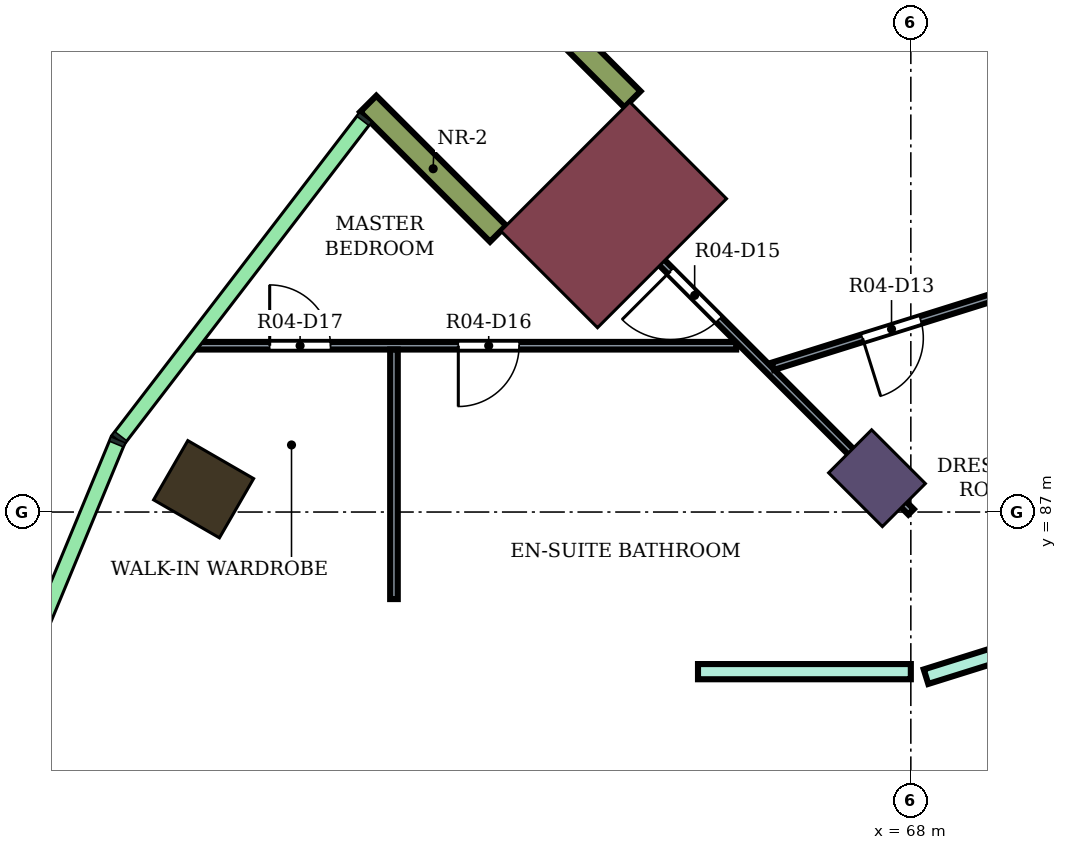
"""IFC4 building model, lengths in metres.
Left out: names, types, materials, properties, quantities, classifications, styles, units other than length and angle.
Written with IfcOpenShell. Run it as: python <this file> out.ifc"""

import sys

from ifc_helpers import new_model, si_unit, direction, frame, frame_2d, origin, origin_2d, place, context, subcontext, project, spatial, rectangle, extrude, element, fill, save


model = new_model("IFC4")
c1 = context("Model", 3, precision=1e-05, world=origin(), true_north=direction((0.0, 1.0)))
c2 = subcontext(c1, "Body", "Model", "MODEL_VIEW")
j1 = project(units=[si_unit("LENGTHUNIT", "METRE"), si_unit("PLANEANGLEUNIT", "RADIAN")], contexts=[c1])
p1 = place(None, origin())
s1 = spatial("IfcSite", under=j1, at=p1, CompositionType="ELEMENT")
p2 = place(p1, origin())
s2 = spatial("IfcBuilding", under=s1, at=p2, CompositionType="ELEMENT")
p3 = place(p2, frame((0.0, 0.0, 198.7)))
s3 = spatial("IfcBuildingStorey", under=s2, at=p3, CompositionType="ELEMENT", Elevation=198.7)
p4 = place(p3, frame((58.696, 87.3, 0.0), z_axis=(0.0, 0.0, 1.0), x_axis=(-0.866025403784, 0.5, 0.0)))
e1 = element("IfcColumn", 1, at=p4, inside=s3, PredefinedType="COLUMN", context=c2, shape_type="SweptSolid", body=[
    extrude(rectangle(XDim=1.0, YDim=0.9, at=origin_2d()), origin(), (0.0, 0.0, 1.0), 4.1),
])
p5 = place(p3, frame((67.555, 87.445, 0.0), z_axis=(0.0, 0.0, 1.0), x_axis=(-0.707106781187, 0.707106781187, 0.0)))
e2 = element("IfcColumn", 2, at=p5, inside=s3, PredefinedType="COLUMN", context=c2, shape_type="SweptSolid", body=[
    extrude(rectangle(XDim=1.0, YDim=0.8, at=origin_2d()), origin(), (0.0, 0.0, 1.0), 4.1),
])
p6 = place(p3, frame((64.09, 90.91, 0.0), z_axis=(0.0, 0.0, 1.0), x_axis=(-0.707106781187, 0.707106781187, 0.0)))
e3 = element("IfcColumn", 3, at=p6, inside=s3, PredefinedType="COLUMN", context=c2, shape_type="SweptSolid", body=[
    extrude(rectangle(XDim=1.8, YDim=2.4, at=origin_2d()), origin(), (0.0, 0.0, 1.0), 4.1),
])
for number, where, z_axis, x_axis in (
    (4, (64.338, 92.43, 0.0), (0.0, 0.0, 1.0), (-0.707, 0.707, 0.0)),
    (5, (62.57, 90.662, 0.0), (0.0, 0.0, 1.0), (-0.707, 0.707, 0.0)),
):
    element("IfcWall", number, at=place(p3, frame(where, z_axis=z_axis, x_axis=x_axis)), inside=s3, PredefinedType="NOTDEFINED", context=c2, shape_type="SweptSolid", body=[
        extrude(rectangle(XDim=2.416, YDim=0.3, at=frame_2d((1.208, 0.0))), origin(), (0.0, 0.0, 1.0), 4.1),
    ])
p7 = place(p3, frame((65.2, 84.9, 0.0), z_axis=(0.0, 0.0, 1.0), x_axis=(1.0, 0.0, 0.0)))
e6 = element("IfcWall", 6, at=p7, inside=s3, PredefinedType="PARTITIONING", context=c2, shape_type="SweptSolid", body=[
    extrude(rectangle(XDim=2.8, YDim=0.2, at=frame_2d((1.4, 0.0))), origin(), (0.0, 0.0, 1.0), 3.65),
])
p8 = place(p3, frame((68.2, 84.834, 0.0), z_axis=(0.0, 0.0, 1.0), x_axis=(0.954272398161, 0.298938438661, 0.0)))
e7 = element("IfcWall", 7, at=p8, inside=s3, PredefinedType="PARTITIONING", context=c2, shape_type="SweptSolid", body=[
    extrude(rectangle(XDim=5.74, YDim=0.2, at=frame_2d((2.87, 0.0))), origin(), (0.0, 0.0, 1.0), 3.65),
])
p9 = place(p3, frame((58.6, 89.188, 0.0), z_axis=(0.0, 0.0, 1.0), x_axis=(1.0, 0.0, 0.0)))
e8 = element("IfcWall", 8, at=p9, inside=s3, PredefinedType="PARTITIONING", context=c2, shape_type="SweptSolid", body=[
    extrude(rectangle(XDim=7.102, YDim=0.1, at=frame_2d((3.551, 0.0))), origin(), (0.0, 0.0, 1.0), 3.65),
])
p10 = place(p9, frame((3.447, 0.0, 0.0)))
e9 = element("IfcOpeningElement", 9, at=p10, cuts=e8, PredefinedType="OPENING", context=c2, shape_type="SweptSolid", body=[
    extrude(rectangle(XDim=0.8, YDim=2.1, at=frame_2d((0.4, 1.05))), frame((0.0, 0.06, 0.0), z_axis=(0.0, -1.0, 0.0), x_axis=(1.0, 0.0, 0.0)), (0.0, 0.0, 1.0), 0.12),
])
p11 = place(p9, frame((0.965, 0.0, 0.0)))
e10 = element("IfcOpeningElement", 10, at=p11, cuts=e8, PredefinedType="OPENING", context=c2, shape_type="SweptSolid", body=[
    extrude(rectangle(XDim=0.8, YDim=2.1, at=frame_2d((0.4, 1.05))), frame((0.0, 0.06, 0.0), z_axis=(0.0, -1.0, 0.0), x_axis=(1.0, 0.0, 0.0)), (0.0, 0.0, 1.0), 0.12),
])
p12 = place(p3, frame((61.2, 85.855, 0.0), z_axis=(0.0, 0.0, 1.0), x_axis=(0.0, 1.0, 0.0)))
e11 = element("IfcWall", 11, at=p12, inside=s3, PredefinedType="PARTITIONING", context=c2, shape_type="SweptSolid", body=[
    extrude(rectangle(XDim=3.283, YDim=0.1, at=frame_2d((1.642, 0.0))), origin(), (0.0, 0.0, 1.0), 3.65),
])
p13 = place(p3, frame((63.599, 91.408, 0.0), z_axis=(0.0, 0.0, 1.0), x_axis=(0.706949994766, -0.70726353285, 0.0)))
e12 = element("IfcWall", 12, at=p13, inside=s3, PredefinedType="PARTITIONING", context=c2, shape_type="SweptSolid", body=[
    extrude(rectangle(XDim=6.229, YDim=0.1, at=frame_2d((3.115, 0.0))), origin(), (0.0, 0.0, 1.0), 3.65),
])
p14 = place(p13, frame((1.753, 0.0, 0.0)))
e13 = element("IfcOpeningElement", 13, at=p14, cuts=e12, PredefinedType="OPENING", context=c2, shape_type="SweptSolid", body=[
    extrude(rectangle(XDim=0.9, YDim=2.1, at=frame_2d((0.45, 1.05))), frame((0.0, 0.06, 0.0), z_axis=(0.0, -1.0, 0.0), x_axis=(1.0, 0.0, 0.0)), (0.0, 0.0, 1.0), 0.12),
])
p15 = place(p3, frame((66.184, 88.917, 0.0), z_axis=(0.0, 0.0, 1.0), x_axis=(0.954213083528, 0.299127717246, 0.0)))
e14 = element("IfcWall", 14, at=p15, inside=s3, PredefinedType="PARTITIONING", context=c2, shape_type="SweptSolid", body=[
    extrude(rectangle(XDim=5.069, YDim=0.1, at=frame_2d((2.535, 0.0))), origin(), (0.0, 0.0, 1.0), 3.65),
])
p16 = place(p15, frame((1.237, 0.0, 0.0)))
e15 = element("IfcOpeningElement", 15, at=p16, cuts=e14, PredefinedType="OPENING", context=c2, shape_type="SweptSolid", body=[
    extrude(rectangle(XDim=0.8, YDim=2.1, at=frame_2d((0.4, 1.05))), frame((0.0, 0.06, 0.0), z_axis=(0.0, -1.0, 0.0), x_axis=(1.0, 0.0, 0.0)), (0.0, 0.0, 1.0), 0.12),
])
p17 = place(p3, frame((67.101, 97.342, 0.0), z_axis=(0.0, 0.0, 1.0), x_axis=(0.499944152966, -0.866057644684, 0.0)))
e16 = element("IfcWall", 16, at=p17, inside=s3, PredefinedType="PARTITIONING", context=c2, shape_type="SweptSolid", body=[
    extrude(rectangle(XDim=12.456, YDim=0.1, at=frame_2d((6.228, 0.0))), origin(), (0.0, 0.0, 1.0), 3.65),
])
p18 = place(p17, frame((2.486, 0.0, 0.0)))
e17 = element("IfcOpeningElement", 17, at=p18, cuts=e16, PredefinedType="OPENING", context=c2, shape_type="SweptSolid", body=[
    extrude(rectangle(XDim=0.9, YDim=2.1, at=frame_2d((0.45, 1.05))), frame((0.0, 0.06, 0.0), z_axis=(0.0, -1.0, 0.0), x_axis=(1.0, 0.0, 0.0)), (0.0, 0.0, 1.0), 0.12),
])
p19 = place(p17, frame((9.85, 0.0, 0.0)))
e18 = element("IfcOpeningElement", 18, at=p19, cuts=e16, PredefinedType="OPENING", context=c2, shape_type="SweptSolid", body=[
    extrude(rectangle(XDim=0.8, YDim=2.1, at=frame_2d((0.4, 1.05))), frame((0.0, 0.06, 0.0), z_axis=(0.0, -1.0, 0.0), x_axis=(1.0, 0.0, 0.0)), (0.0, 0.0, 1.0), 0.12),
])
p20 = place(p16, frame((0.8, 0.0, 0.0), z_axis=(0.0, 0.0, 1.0), x_axis=(-1.0, 0.0, 0.0)))
e19 = element("IfcDoor", 19, at=p20, inside=s3, OperationType="SINGLE_SWING_RIGHT", PredefinedType="DOOR", context=c2, shape_type="SweptSolid", body=[
    extrude(rectangle(XDim=0.8, YDim=2.1, at=frame_2d((0.4, 1.05))), frame((0.0, 0.025, 0.0), z_axis=(0.0, -1.0, 0.0), x_axis=(1.0, 0.0, 0.0)), (0.0, 0.0, 1.0), 0.05),
])
fill(e15, e19)
p21 = place(p14, frame((0.9, 0.0, 0.0), z_axis=(0.0, 0.0, 1.0), x_axis=(-1.0, 0.0, 0.0)))
e20 = element("IfcDoor", 20, at=p21, inside=s3, OperationType="SINGLE_SWING_RIGHT", PredefinedType="DOOR", context=c2, shape_type="SweptSolid", body=[
    extrude(rectangle(XDim=0.9, YDim=2.1, at=frame_2d((0.45, 1.05))), frame((0.0, 0.025, 0.0), z_axis=(0.0, -1.0, 0.0), x_axis=(1.0, 0.0, 0.0)), (0.0, 0.0, 1.0), 0.05),
])
fill(e13, e20)
p22 = place(p10, frame((0.8, 0.0, 0.0), z_axis=(0.0, 0.0, 1.0), x_axis=(-1.0, 0.0, 0.0)))
e21 = element("IfcDoor", 21, at=p22, inside=s3, OperationType="SINGLE_SWING_RIGHT", PredefinedType="DOOR", context=c2, shape_type="SweptSolid", body=[
    extrude(rectangle(XDim=0.8, YDim=2.1, at=frame_2d((0.4, 1.05))), frame((0.0, 0.025, 0.0), z_axis=(0.0, -1.0, 0.0), x_axis=(1.0, 0.0, 0.0)), (0.0, 0.0, 1.0), 0.05),
])
fill(e9, e21)
p23 = place(p11, origin())
e22 = element("IfcDoor", 22, at=p23, inside=s3, OperationType="SINGLE_SWING_LEFT", PredefinedType="DOOR", context=c2, shape_type="SweptSolid", body=[
    extrude(rectangle(XDim=0.8, YDim=2.1, at=frame_2d((0.4, 1.05))), frame((0.0, 0.025, 0.0), z_axis=(0.0, -1.0, 0.0), x_axis=(1.0, 0.0, 0.0)), (0.0, 0.0, 1.0), 0.05),
])
fill(e10, e22)
save(model, sys.argv[1])
